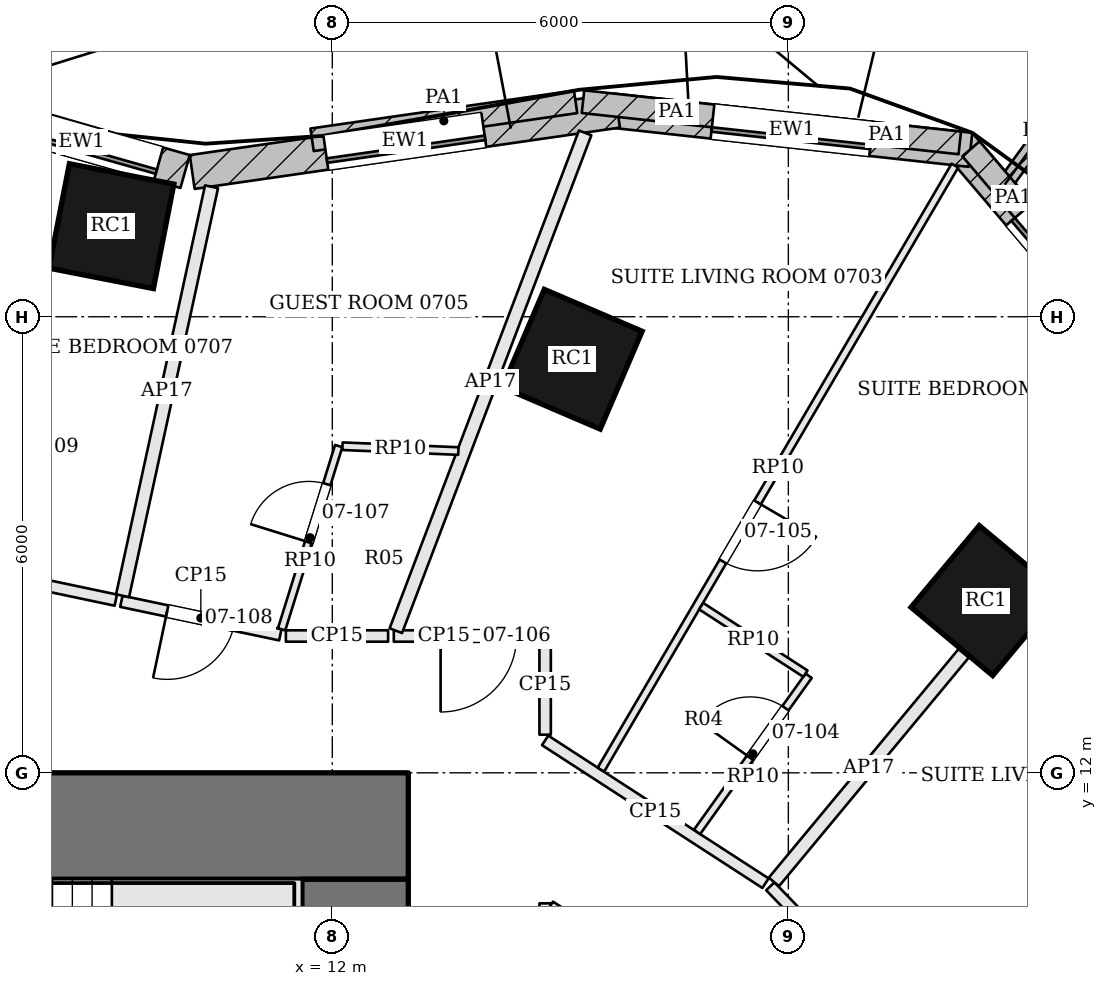
"""IFC4 building model, lengths in metres.
Left out: names, types, materials, properties, quantities, classifications, styles, units other than length and angle.
Written with IfcOpenShell. Run it as: python <this file> out.ifc"""

import sys

from ifc_helpers import new_model, si_unit, direction, frame, frame_2d, origin, origin_2d, place, context, subcontext, project, spatial, rectangle, extrude, element, fill, save


model = new_model("IFC4")
c1 = context("Model", 3, precision=1e-05, world=origin(), true_north=direction((0.0, 1.0)))
c2 = subcontext(c1, "Body", "Model", "MODEL_VIEW")
j1 = project(units=[si_unit("LENGTHUNIT", "METRE"), si_unit("PLANEANGLEUNIT", "RADIAN")], contexts=[c1])
p1 = place(None, origin())
s1 = spatial("IfcSite", under=j1, at=p1, CompositionType="ELEMENT")
p2 = place(p1, origin())
s2 = spatial("IfcBuilding", under=s1, at=p2, CompositionType="ELEMENT")
p3 = place(p2, frame((0.0, 0.0, 41.1)))
s3 = spatial("IfcBuildingStorey", under=s2, at=p3, CompositionType="ELEMENT", Elevation=41.1)
p4 = place(p3, frame((-13.0, 11.3, 0.0), z_axis=(0.0, 0.0, 1.0), x_axis=(1.0, 0.0, 0.0)))
e1 = element("IfcWall", 1, at=p4, inside=s3, PredefinedType="SHEAR", context=c2, shape_type="SweptSolid", body=[
    extrude(rectangle(XDim=26.0, YDim=1.4, at=frame_2d((13.0, 0.0))), origin(), (0.0, 0.0, 1.0), 3.6),
])
p5 = place(p4, frame((8.825, 0.0, 0.0)))
e2 = element("IfcOpeningElement", 2, at=p5, cuts=e1, PredefinedType="OPENING", context=c2, shape_type="SweptSolid", body=[
    extrude(rectangle(XDim=1.0, YDim=2.1, at=frame_2d((0.5, 1.05))), frame((0.0, 0.71, 0.0), z_axis=(0.0, -1.0, 0.0), x_axis=(1.0, 0.0, 0.0)), (0.0, 0.0, 1.0), 1.42),
])
p6 = place(p4, frame((11.275, 0.0, 0.0)))
e3 = element("IfcOpeningElement", 3, at=p6, cuts=e1, PredefinedType="OPENING", context=c2, shape_type="SweptSolid", body=[
    extrude(rectangle(XDim=1.0, YDim=2.1, at=frame_2d((0.5, 1.05))), frame((0.0, 0.71, 0.0), z_axis=(0.0, -1.0, 0.0), x_axis=(1.0, 0.0, 0.0)), (0.0, 0.0, 1.0), 1.42),
])
p7 = place(p4, frame((14.125, 0.0, 0.0)))
e4 = element("IfcOpeningElement", 4, at=p7, cuts=e1, PredefinedType="OPENING", context=c2, shape_type="SweptSolid", body=[
    extrude(rectangle(XDim=1.0, YDim=2.1, at=frame_2d((0.5, 1.05))), frame((0.0, 0.71, 0.0), z_axis=(0.0, -1.0, 0.0), x_axis=(1.0, 0.0, 0.0)), (0.0, 0.0, 1.0), 1.42),
])
p8 = place(p4, frame((16.725, 0.0, 0.0)))
e5 = element("IfcOpeningElement", 5, at=p8, cuts=e1, PredefinedType="OPENING", context=c2, shape_type="SweptSolid", body=[
    extrude(rectangle(XDim=0.7, YDim=2.1, at=frame_2d((0.35, 1.05))), frame((0.0, 0.71, 0.0), z_axis=(0.0, -1.0, 0.0), x_axis=(1.0, 0.0, 0.0)), (0.0, 0.0, 1.0), 1.42),
])
p9 = place(p3, frame((12.3, -1.6, 0.0), z_axis=(0.0, 0.0, 1.0), x_axis=(0.0, 1.0, 0.0)))
e6 = element("IfcWall", 6, at=p9, inside=s3, PredefinedType="SHEAR", context=c2, shape_type="SweptSolid", body=[
    extrude(rectangle(XDim=12.2, YDim=1.4, at=frame_2d((6.1, 0.0))), origin(), (0.0, 0.0, 1.0), 3.6),
])
p10 = place(p9, frame((6.8, 0.0, 0.0)))
e7 = element("IfcOpeningElement", 7, at=p10, cuts=e6, PredefinedType="OPENING", context=c2, shape_type="SweptSolid", body=[
    extrude(rectangle(XDim=1.8, YDim=2.1, at=frame_2d((0.9, 1.05))), frame((0.0, 0.71, 0.0), z_axis=(0.0, -1.0, 0.0), x_axis=(1.0, 0.0, 0.0)), (0.0, 0.0, 1.0), 1.42),
])
for number, where, z_axis, x_axis in (
    (8, (20.6, 14.266, 0.0), (0.0, 0.0, 1.0), (-0.767, 0.641, 0.0)),
    (9, (15.157, 17.441, 0.0), (0.0, 0.0, 1.0), (-0.919, 0.394, 0.0)),
    (10, (9.094, 19.192, 0.0), (0.0, 0.0, 1.0), (-0.981, 0.192, 0.0)),
):
    element("IfcColumn", number, at=place(p3, frame(where, z_axis=z_axis, x_axis=x_axis)), inside=s3, PredefinedType="COLUMN", context=c2, shape_type="SweptSolid", body=[
        extrude(rectangle(XDim=1.4, YDim=1.4, at=origin_2d()), origin(), (0.0, 0.0, 1.0), 3.6),
    ])
p11 = place(p3, frame((23.187, 16.825, 0.0), z_axis=(0.0, 0.0, 1.0), x_axis=(-0.648462985992, 0.761246186065, 0.0)))
e11 = element("IfcWall", 11, at=p11, inside=s3, PredefinedType="SOLIDWALL", context=c2, shape_type="SweptSolid", body=[
    extrude(rectangle(XDim=4.531, YDim=0.45, at=frame_2d((2.265, 0.0))), origin(), (0.0, 0.0, 1.0), 3.4),
])
p12 = place(p11, frame((1.215, 0.0, 0.9)))
e12 = element("IfcOpeningElement", 12, at=p12, cuts=e11, PredefinedType="OPENING", context=c2, shape_type="SweptSolid", body=[
    extrude(rectangle(XDim=2.1, YDim=2.0, at=frame_2d((1.05, 1.0))), frame((0.0, 0.235, 0.0), z_axis=(0.0, -1.0, 0.0), x_axis=(1.0, 0.0, 0.0)), (0.0, 0.0, 1.0), 0.47),
])
p13 = place(p3, frame((20.396, 20.196, 0.0), z_axis=(0.0, 0.0, 1.0), x_axis=(-0.994063142291, 0.108804729393, 0.0)))
e13 = element("IfcWall", 13, at=p13, inside=s3, PredefinedType="SOLIDWALL", context=c2, shape_type="SweptSolid", body=[
    extrude(rectangle(XDim=4.728, YDim=0.45, at=frame_2d((2.364, 0.0))), origin(), (0.0, 0.0, 1.0), 3.4),
])
p14 = place(p13, frame((1.314, 0.0, 0.9)))
e14 = element("IfcOpeningElement", 14, at=p14, cuts=e13, PredefinedType="OPENING", context=c2, shape_type="SweptSolid", body=[
    extrude(rectangle(XDim=2.1, YDim=2.0, at=frame_2d((1.05, 1.0))), frame((0.0, 0.235, 0.0), z_axis=(0.0, -1.0, 0.0), x_axis=(1.0, 0.0, 0.0)), (0.0, 0.0, 1.0), 0.47),
])
p15 = place(p3, frame((15.752, 20.711, 0.0), z_axis=(0.0, 0.0, 1.0), x_axis=(-0.989761192351, -0.142733255115, 0.0)))
e15 = element("IfcWall", 15, at=p15, inside=s3, PredefinedType="SOLIDWALL", context=c2, shape_type="SweptSolid", body=[
    extrude(rectangle(XDim=5.653, YDim=0.45, at=frame_2d((2.827, 0.0))), origin(), (0.0, 0.0, 1.0), 3.4),
])
p16 = place(p15, frame((1.777, 0.0, 0.9)))
e16 = element("IfcOpeningElement", 16, at=p16, cuts=e15, PredefinedType="OPENING", context=c2, shape_type="SweptSolid", body=[
    extrude(rectangle(XDim=2.1, YDim=2.0, at=frame_2d((1.05, 1.0))), frame((0.0, 0.235, 0.0), z_axis=(0.0, -1.0, 0.0), x_axis=(1.0, 0.0, 0.0)), (0.0, 0.0, 1.0), 0.47),
])
p17 = place(p3, frame((10.063, 19.911, 0.0), z_axis=(0.0, 0.0, 1.0), x_axis=(-0.961982029567, 0.273112751057, 0.0)))
e17 = element("IfcWall", 17, at=p17, inside=s3, PredefinedType="SOLIDWALL", context=c2, shape_type="SweptSolid", body=[
    extrude(rectangle(XDim=2.827, YDim=0.45, at=frame_2d((1.414, 0.0))), origin(), (0.0, 0.0, 1.0), 3.4),
])
p18 = place(p17, frame((0.364, 0.0, 0.9)))
e18 = element("IfcOpeningElement", 18, at=p18, cuts=e17, PredefinedType="OPENING", context=c2, shape_type="SweptSolid", body=[
    extrude(rectangle(XDim=2.1, YDim=2.0, at=frame_2d((1.05, 1.0))), frame((0.0, 0.235, 0.0), z_axis=(0.0, -1.0, 0.0), x_axis=(1.0, 0.0, 0.0)), (0.0, 0.0, 1.0), 0.47),
])
p19 = place(p3, frame((20.846, 19.739, 0.0), z_axis=(0.0, 0.0, 1.0), x_axis=(0.587607490034, 0.809146116382, 0.0)))
e19 = element("IfcWall", 19, at=p19, inside=s3, PredefinedType="SOLIDWALL", context=c2, shape_type="SweptSolid", body=[
    extrude(rectangle(XDim=1.75, YDim=0.2, at=frame_2d((0.875, 0.0))), origin(), (0.0, 0.0, 1.0), 3.4),
])
p20 = place(p3, frame((21.513, 18.906, 3.6), z_axis=(0.0, 0.0, 1.0), x_axis=(-0.648451151452, 0.761256267088, 0.0)))
e20 = element("IfcWall", 20, at=p20, inside=s3, PredefinedType="PARAPET", context=c2, shape_type="SweptSolid", body=[
    extrude(rectangle(XDim=1.712, YDim=0.3, at=frame_2d((0.856, 0.0))), origin(), (0.0, 0.0, 1.0), 1.1),
])
p21 = place(p3, frame((20.255, 20.287, 3.6), z_axis=(0.0, 0.0, 1.0), x_axis=(-0.994062724773, 0.108808543863, 0.0)))
e21 = element("IfcWall", 21, at=p21, inside=s3, PredefinedType="PARAPET", context=c2, shape_type="SweptSolid", body=[
    extrude(rectangle(XDim=1.932, YDim=0.3, at=frame_2d((0.966, 0.0))), origin(), (0.0, 0.0, 1.0), 1.1),
])
p22 = place(p3, frame((17.772, 20.559, 3.6), z_axis=(0.0, 0.0, 1.0), x_axis=(-0.994063072833, 0.108805363973, 0.0)))
e22 = element("IfcWall", 22, at=p22, inside=s3, PredefinedType="PARAPET", context=c2, shape_type="SweptSolid", body=[
    extrude(rectangle(XDim=2.489, YDim=0.3, at=frame_2d((1.244, 0.0))), origin(), (0.0, 0.0, 1.0), 1.1),
])
p23 = place(p3, frame((15.201, 20.828, 3.6), z_axis=(0.0, 0.0, 1.0), x_axis=(-0.989761856496, -0.142728649634, 0.0)))
e23 = element("IfcWall", 23, at=p23, inside=s3, PredefinedType="PARAPET", context=c2, shape_type="SweptSolid", body=[
    extrude(rectangle(XDim=3.503, YDim=0.3, at=frame_2d((1.751, 0.0))), origin(), (0.0, 0.0, 1.0), 1.1),
])
p24 = place(p3, frame((19.663, 8.542, 0.0), z_axis=(0.0, 0.0, 1.0), x_axis=(-0.695220577526, 0.718796458383, 0.0)))
e24 = element("IfcWall", 24, at=p24, inside=s3, PredefinedType="PARTITIONING", context=c2, shape_type="SweptSolid", body=[
    extrude(rectangle(XDim=2.734, YDim=0.15, at=frame_2d((1.367, 0.0))), origin(), (0.0, 0.0, 1.0), 2.68),
])
p25 = place(p24, frame((0.945, 0.0, 0.0)))
e25 = element("IfcOpeningElement", 25, at=p25, cuts=e24, PredefinedType="OPENING", context=c2, shape_type="SweptSolid", body=[
    extrude(rectangle(XDim=1.0, YDim=2.1, at=frame_2d((0.5, 1.05))), frame((0.0, 0.085, 0.0), z_axis=(0.0, -1.0, 0.0), x_axis=(1.0, 0.0, 0.0)), (0.0, 0.0, 1.0), 0.17),
])
p26 = place(p3, frame((20.307, 13.573, 0.0), z_axis=(0.0, 0.0, 1.0), x_axis=(-0.638751887509, -0.769412780114, 0.0)))
e26 = element("IfcWall", 26, at=p26, inside=s3, PredefinedType="PARTITIONING", context=c2, shape_type="SweptSolid", body=[
    extrude(rectangle(XDim=3.909, YDim=0.175, at=frame_2d((1.955, 0.0))), origin(), (0.0, 0.0, 1.0), 2.68),
])
p27 = place(p3, frame((17.699, 10.548, 0.0), z_axis=(0.0, 0.0, 1.0), x_axis=(-0.839188825453, 0.54384015596, 0.0)))
e27 = element("IfcWall", 27, at=p27, inside=s3, PredefinedType="PARTITIONING", context=c2, shape_type="SweptSolid", body=[
    extrude(rectangle(XDim=3.454, YDim=0.15, at=frame_2d((1.727, 0.0))), origin(), (0.0, 0.0, 1.0), 2.68),
])
p28 = place(p3, frame((14.8, 12.502, 0.0), z_axis=(0.0, 0.0, 1.0), x_axis=(-0.000188040613, 0.99999998232, 0.0)))
e28 = element("IfcWall", 28, at=p28, inside=s3, PredefinedType="PARTITIONING", context=c2, shape_type="SweptSolid", body=[
    extrude(rectangle(XDim=1.298, YDim=0.15, at=frame_2d((0.649, 0.0))), origin(), (0.0, 0.0, 1.0), 2.68),
])
p29 = place(p3, frame((14.725, 13.8, 0.0), z_axis=(0.0, 0.0, 1.0), x_axis=(-1.0, 0.0, 0.0)))
e29 = element("IfcWall", 29, at=p29, inside=s3, PredefinedType="PARTITIONING", context=c2, shape_type="SweptSolid", body=[
    extrude(rectangle(XDim=1.916, YDim=0.15, at=frame_2d((0.958, 0.0))), origin(), (0.0, 0.0, 1.0), 2.68),
])
p30 = place(p29, frame((0.3, 0.0, 0.0)))
e30 = element("IfcOpeningElement", 30, at=p30, cuts=e29, PredefinedType="OPENING", context=c2, shape_type="SweptSolid", body=[
    extrude(rectangle(XDim=1.0, YDim=2.1, at=frame_2d((0.5, 1.05))), frame((0.0, 0.085, 0.0), z_axis=(0.0, -1.0, 0.0), x_axis=(1.0, 0.0, 0.0)), (0.0, 0.0, 1.0), 0.17),
])
p31 = place(p3, frame((15.327, 20.419, 0.0), z_axis=(0.0, 0.0, 1.0), x_axis=(-0.355499704179, -0.934676393373, 0.0)))
e31 = element("IfcWall", 31, at=p31, inside=s3, PredefinedType="PARTITIONING", context=c2, shape_type="SweptSolid", body=[
    extrude(rectangle(XDim=7.006, YDim=0.175, at=frame_2d((3.503, 0.0))), origin(), (0.0, 0.0, 1.0), 2.68),
])
p32 = place(p3, frame((12.734, 13.8, 0.0), z_axis=(0.0, 0.0, 1.0), x_axis=(-1.0, 0.0, 0.0)))
e32 = element("IfcWall", 32, at=p32, inside=s3, PredefinedType="PARTITIONING", context=c2, shape_type="SweptSolid", body=[
    extrude(rectangle(XDim=1.345, YDim=0.15, at=frame_2d((0.672, 0.0))), origin(), (0.0, 0.0, 1.0), 2.68),
])
p33 = place(p3, frame((11.316, 13.815, 0.0), z_axis=(0.0, 0.0, 1.0), x_axis=(-0.978461212154, 0.206430754275, 0.0)))
e33 = element("IfcWall", 33, at=p33, inside=s3, PredefinedType="PARTITIONING", context=c2, shape_type="SweptSolid", body=[
    extrude(rectangle(XDim=2.137, YDim=0.15, at=frame_2d((1.069, 0.0))), origin(), (0.0, 0.0, 1.0), 2.68),
])
p34 = place(p33, frame((0.621, 0.0, 0.0)))
e34 = element("IfcOpeningElement", 34, at=p34, cuts=e33, PredefinedType="OPENING", context=c2, shape_type="SweptSolid", body=[
    extrude(rectangle(XDim=0.9, YDim=2.4, at=frame_2d((0.45, 1.2))), frame((0.0, 0.085, 0.0), z_axis=(0.0, -1.0, 0.0), x_axis=(1.0, 0.0, 0.0)), (0.0, 0.0, 1.0), 0.17),
])
p35 = place(p3, frame((10.411, 19.71, 0.0), z_axis=(0.0, 0.0, 1.0), x_axis=(-0.212613726561, -0.977136327888, 0.0)))
e35 = element("IfcWall", 35, at=p35, inside=s3, PredefinedType="PARTITIONING", context=c2, shape_type="SweptSolid", body=[
    extrude(rectangle(XDim=5.506, YDim=0.175, at=frame_2d((2.753, 0.0))), origin(), (0.0, 0.0, 1.0), 2.68),
])
p36 = place(p3, frame((9.152, 14.272, 0.0), z_axis=(0.0, 0.0, 1.0), x_axis=(-0.978472647326, 0.206376545266, 0.0)))
e36 = element("IfcWall", 36, at=p36, inside=s3, PredefinedType="PARTITIONING", context=c2, shape_type="SweptSolid", body=[
    extrude(rectangle(XDim=2.857, YDim=0.15, at=frame_2d((1.428, 0.0))), origin(), (0.0, 0.0, 1.0), 2.68),
])
p37 = place(p3, frame((14.8, -4.725, 0.0), z_axis=(0.0, 0.0, 1.0), x_axis=(0.0, 1.0, 0.0)))
e37 = element("IfcWall", 37, at=p37, inside=s3, PredefinedType="PARTITIONING", context=c2, shape_type="SweptSolid", body=[
    extrude(rectangle(XDim=15.008, YDim=0.15, at=frame_2d((7.504, 0.0))), origin(), (0.0, 0.0, 1.0), 2.68),
])
p38 = place(p37, frame((6.566, 0.0, 0.0)))
e38 = element("IfcOpeningElement", 38, at=p38, cuts=e37, PredefinedType="OPENING", context=c2, shape_type="SweptSolid", body=[
    extrude(rectangle(XDim=1.8, YDim=2.1, at=frame_2d((0.9, 1.05))), frame((0.0, 0.085, 0.0), z_axis=(0.0, -1.0, 0.0), x_axis=(1.0, 0.0, 0.0)), (0.0, 0.0, 1.0), 0.17),
])
p39 = place(p3, frame((14.863, 10.242, 0.0), z_axis=(0.0, 0.0, 1.0), x_axis=(0.839530811724, -0.543312079901, 0.0)))
e39 = element("IfcWall", 39, at=p39, inside=s3, PredefinedType="PARTITIONING", context=c2, shape_type="SweptSolid", body=[
    extrude(rectangle(XDim=1.998, YDim=0.15, at=frame_2d((0.999, 0.0))), origin(), (0.0, 0.0, 1.0), 2.68),
])
p40 = place(p3, frame((24.11, 12.42, 0.0), z_axis=(0.0, 0.0, 1.0), x_axis=(-0.770718759666, -0.637175480931, 0.0)))
e40 = element("IfcWall", 40, at=p40, inside=s3, PredefinedType="PARTITIONING", context=c2, shape_type="SweptSolid", body=[
    extrude(rectangle(XDim=5.835, YDim=0.1, at=frame_2d((2.918, 0.0))), origin(), (0.0, 0.0, 1.0), 2.68),
])
p41 = place(p40, frame((1.761, 0.0, 0.0)))
e41 = element("IfcOpeningElement", 41, at=p41, cuts=e40, PredefinedType="OPENING", context=c2, shape_type="SweptSolid", body=[
    extrude(rectangle(XDim=0.9, YDim=2.4, at=frame_2d((0.45, 1.2))), frame((0.0, 0.06, 0.0), z_axis=(0.0, -1.0, 0.0), x_axis=(1.0, 0.0, 0.0)), (0.0, 0.0, 1.0), 0.12),
])
p42 = place(p3, frame((20.191, 19.988, 0.0), z_axis=(0.0, 0.0, 1.0), x_axis=(-0.505620182585, -0.862756182802, 0.0)))
e42 = element("IfcWall", 42, at=p42, inside=s3, PredefinedType="PARTITIONING", context=c2, shape_type="SweptSolid", body=[
    extrude(rectangle(XDim=9.211, YDim=0.1, at=frame_2d((4.605, 0.0))), origin(), (0.0, 0.0, 1.0), 2.68),
])
p43 = place(p42, frame((5.136, 0.0, 0.0)))
e43 = element("IfcOpeningElement", 43, at=p43, cuts=e42, PredefinedType="OPENING", context=c2, shape_type="SweptSolid", body=[
    extrude(rectangle(XDim=0.9, YDim=2.4, at=frame_2d((0.45, 1.2))), frame((0.0, 0.06, 0.0), z_axis=(0.0, -1.0, 0.0), x_axis=(1.0, 0.0, 0.0)), (0.0, 0.0, 1.0), 0.12),
])
p44 = place(p3, frame((16.799, 11.223, 0.0), z_axis=(0.0, 0.0, 1.0), x_axis=(0.581494263037, 0.81355050369, 0.0)))
e44 = element("IfcWall", 44, at=p44, inside=s3, PredefinedType="PARTITIONING", context=c2, shape_type="SweptSolid", body=[
    extrude(rectangle(XDim=2.525, YDim=0.1, at=frame_2d((1.262, 0.0))), origin(), (0.0, 0.0, 1.0), 2.68),
])
p45 = place(p44, frame((1.2, 0.0, 0.0)))
e45 = element("IfcOpeningElement", 45, at=p45, cuts=e44, PredefinedType="OPENING", context=c2, shape_type="SweptSolid", body=[
    extrude(rectangle(XDim=0.8, YDim=2.1, at=frame_2d((0.4, 1.05))), frame((0.0, 0.06, 0.0), z_axis=(0.0, -1.0, 0.0), x_axis=(1.0, 0.0, 0.0)), (0.0, 0.0, 1.0), 0.12),
])
p46 = place(p3, frame((18.225, 13.304, 0.0), z_axis=(0.0, 0.0, 1.0), x_axis=(-0.839486017112, 0.543381290692, 0.0)))
e46 = element("IfcWall", 46, at=p46, inside=s3, PredefinedType="PARTITIONING", context=c2, shape_type="SweptSolid", body=[
    extrude(rectangle(XDim=1.635, YDim=0.1, at=frame_2d((0.817, 0.0))), origin(), (0.0, 0.0, 1.0), 2.68),
])
p47 = place(p3, frame((11.333, 13.888, 0.0), z_axis=(0.0, 0.0, 1.0), x_axis=(0.297311415603, 0.954780562303, 0.0)))
e47 = element("IfcWall", 47, at=p47, inside=s3, PredefinedType="PARTITIONING", context=c2, shape_type="SweptSolid", body=[
    extrude(rectangle(XDim=2.525, YDim=0.1, at=frame_2d((1.263, 0.0))), origin(), (0.0, 0.0, 1.0), 2.68),
])
p48 = place(p47, frame((1.2, 0.0, 0.0)))
e48 = element("IfcOpeningElement", 48, at=p48, cuts=e47, PredefinedType="OPENING", context=c2, shape_type="SweptSolid", body=[
    extrude(rectangle(XDim=0.8, YDim=2.1, at=frame_2d((0.4, 1.05))), frame((0.0, 0.06, 0.0), z_axis=(0.0, -1.0, 0.0), x_axis=(1.0, 0.0, 0.0)), (0.0, 0.0, 1.0), 0.12),
])
p49 = place(p3, frame((12.134, 16.297, 0.0), z_axis=(0.0, 0.0, 1.0), x_axis=(0.999134735698, -0.041590623004, 0.0)))
e49 = element("IfcWall", 49, at=p49, inside=s3, PredefinedType="PARTITIONING", context=c2, shape_type="SweptSolid", body=[
    extrude(rectangle(XDim=1.526, YDim=0.1, at=frame_2d((0.763, 0.0))), origin(), (0.0, 0.0, 1.0), 2.68),
])
p50 = place(p12, origin())
e50 = element("IfcWindow", 50, at=p50, inside=s3, PartitioningType="SINGLE_PANEL", PredefinedType="WINDOW", context=c2, shape_type="SweptSolid", body=[
    extrude(rectangle(XDim=2.1, YDim=2.0, at=frame_2d((1.05, 1.0))), frame((0.0, 0.135, 0.0), z_axis=(0.0, -1.0, 0.0), x_axis=(1.0, 0.0, 0.0)), (0.0, 0.0, 1.0), 0.06),
])
fill(e12, e50)
p51 = place(p14, origin())
e51 = element("IfcWindow", 51, at=p51, inside=s3, PartitioningType="SINGLE_PANEL", PredefinedType="WINDOW", context=c2, shape_type="SweptSolid", body=[
    extrude(rectangle(XDim=2.1, YDim=2.0, at=frame_2d((1.05, 1.0))), frame((0.0, 0.135, 0.0), z_axis=(0.0, -1.0, 0.0), x_axis=(1.0, 0.0, 0.0)), (0.0, 0.0, 1.0), 0.06),
])
fill(e14, e51)
p52 = place(p16, origin())
e52 = element("IfcWindow", 52, at=p52, inside=s3, PartitioningType="SINGLE_PANEL", PredefinedType="WINDOW", context=c2, shape_type="SweptSolid", body=[
    extrude(rectangle(XDim=2.1, YDim=2.0, at=frame_2d((1.05, 1.0))), frame((0.0, 0.135, 0.0), z_axis=(0.0, -1.0, 0.0), x_axis=(1.0, 0.0, 0.0)), (0.0, 0.0, 1.0), 0.06),
])
fill(e16, e52)
p53 = place(p18, origin())
e53 = element("IfcWindow", 53, at=p53, inside=s3, PartitioningType="SINGLE_PANEL", PredefinedType="WINDOW", context=c2, shape_type="SweptSolid", body=[
    extrude(rectangle(XDim=2.1, YDim=2.0, at=frame_2d((1.05, 1.0))), frame((0.0, 0.135, 0.0), z_axis=(0.0, -1.0, 0.0), x_axis=(1.0, 0.0, 0.0)), (0.0, 0.0, 1.0), 0.06),
])
fill(e18, e53)
p54 = place(p45, origin())
e54 = element("IfcDoor", 54, at=p54, inside=s3, OperationType="SINGLE_SWING_LEFT", PredefinedType="DOOR", context=c2, shape_type="SweptSolid", body=[
    extrude(rectangle(XDim=0.8, YDim=2.1, at=frame_2d((0.4, 1.05))), frame((0.0, 0.025, 0.0), z_axis=(0.0, -1.0, 0.0), x_axis=(1.0, 0.0, 0.0)), (0.0, 0.0, 1.0), 0.05),
])
fill(e45, e54)
p55 = place(p43, origin())
e55 = element("IfcDoor", 55, at=p55, inside=s3, OperationType="SINGLE_SWING_LEFT", PredefinedType="DOOR", context=c2, shape_type="SweptSolid", body=[
    extrude(rectangle(XDim=0.9, YDim=2.4, at=frame_2d((0.45, 1.2))), frame((0.0, 0.025, 0.0), z_axis=(0.0, -1.0, 0.0), x_axis=(1.0, 0.0, 0.0)), (0.0, 0.0, 1.0), 0.05),
])
fill(e43, e55)
p56 = place(p30, origin())
e56 = element("IfcDoor", 56, at=p56, inside=s3, OperationType="SINGLE_SWING_RIGHT", PredefinedType="DOOR", context=c2, shape_type="SweptSolid", body=[
    extrude(rectangle(XDim=1.0, YDim=2.1, at=frame_2d((0.5, 1.05))), frame((0.0, 0.025, 0.0), z_axis=(0.0, -1.0, 0.0), x_axis=(1.0, 0.0, 0.0)), (0.0, 0.0, 1.0), 0.05),
])
fill(e30, e56)
p57 = place(p48, origin())
e57 = element("IfcDoor", 57, at=p57, inside=s3, OperationType="SINGLE_SWING_LEFT", PredefinedType="DOOR", context=c2, shape_type="SweptSolid", body=[
    extrude(rectangle(XDim=0.8, YDim=2.1, at=frame_2d((0.4, 1.05))), frame((0.0, 0.025, 0.0), z_axis=(0.0, -1.0, 0.0), x_axis=(1.0, 0.0, 0.0)), (0.0, 0.0, 1.0), 0.05),
])
fill(e48, e57)
p58 = place(p34, origin())
e58 = element("IfcDoor", 58, at=p58, inside=s3, OperationType="SINGLE_SWING_RIGHT", PredefinedType="DOOR", context=c2, shape_type="SweptSolid", body=[
    extrude(rectangle(XDim=0.9, YDim=2.4, at=frame_2d((0.45, 1.2))), frame((0.0, 0.025, 0.0), z_axis=(0.0, -1.0, 0.0), x_axis=(1.0, 0.0, 0.0)), (0.0, 0.0, 1.0), 0.05),
])
fill(e34, e58)
save(model, sys.argv[1])
